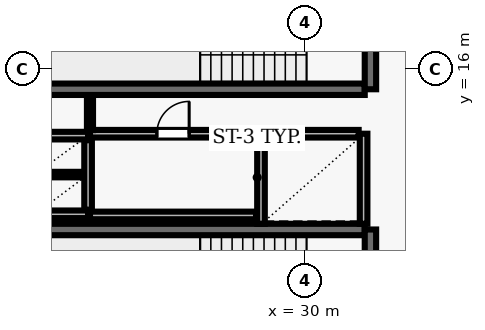
"""IFC4 building model, lengths in metres.
Left out: names, types, materials, properties, quantities, classifications, styles, units other than length and angle.
Written with IfcOpenShell. Run it as: python <this file> out.ifc"""

import sys

from ifc_helpers import new_model, si_unit, direction, frame, frame_2d, origin, place, context, subcontext, project, spatial, rectangle, extrude, element, fill, save


model = new_model("IFC4")
c1 = context("Model", 3, precision=1e-05, world=origin(), true_north=direction((0.0, 1.0)))
c2 = subcontext(c1, "Body", "Model", "MODEL_VIEW")
j1 = project(units=[si_unit("LENGTHUNIT", "METRE"), si_unit("PLANEANGLEUNIT", "RADIAN")], contexts=[c1])
p1 = place(None, origin())
s1 = spatial("IfcSite", under=j1, at=p1, CompositionType="ELEMENT")
p2 = place(p1, origin())
s2 = spatial("IfcBuilding", under=s1, at=p2, CompositionType="ELEMENT")
p3 = place(p2, frame((0.0, 0.0, 154.1)))
s3 = spatial("IfcBuildingStorey", under=s2, at=p3, CompositionType="ELEMENT", Elevation=154.1)
p4 = place(p3, frame((23.22, 15.47, 0.0), z_axis=(0.0, 0.0, 1.0), x_axis=(1.0, 0.0, 0.0)))
e1 = element("IfcWall", 1, at=p4, inside=s3, PredefinedType="SHEAR", context=c2, shape_type="SweptSolid", body=[
    extrude(rectangle(XDim=8.36, YDim=0.3, at=frame_2d((4.18, 0.0))), origin(), (0.0, 0.0, 1.0), 3.69),
])
p5 = place(p3, frame((31.73, 15.47, 0.0), z_axis=(0.0, 0.0, 1.0), x_axis=(0.0, 1.0, 0.0)))
e2 = element("IfcWall", 2, at=p5, inside=s3, PredefinedType="SHEAR", context=c2, shape_type="SweptSolid", body=[
    extrude(rectangle(XDim=3.51, YDim=0.3, at=frame_2d((1.755, 0.0))), origin(), (0.0, 0.0, 1.0), 3.69),
])
p6 = place(p5, frame((1.18, 0.0, 0.0)))
e3 = element("IfcOpeningElement", 3, at=p6, cuts=e2, PredefinedType="OPENING", context=c2, shape_type="SweptSolid", body=[
    extrude(rectangle(XDim=1.15, YDim=2.15, at=frame_2d((0.575, 1.075))), frame((0.0, 0.16, 0.0), z_axis=(0.0, -1.0, 0.0), x_axis=(1.0, 0.0, 0.0)), (0.0, 0.0, 1.0), 0.32),
])
p7 = place(p3, frame((31.58, 11.78, 0.0), z_axis=(0.0, 0.0, 1.0), x_axis=(-1.0, 0.0, 0.0)))
e4 = element("IfcWall", 4, at=p7, inside=s3, PredefinedType="SHEAR", context=c2, shape_type="SweptSolid", body=[
    extrude(rectangle(XDim=8.36, YDim=0.3, at=frame_2d((4.18, 0.0))), origin(), (0.0, 0.0, 1.0), 3.69),
])
p8 = place(p3, frame((31.73, 8.27, 0.0), z_axis=(0.0, 0.0, 1.0), x_axis=(0.0, 1.0, 0.0)))
e5 = element("IfcWall", 5, at=p8, inside=s3, PredefinedType="SHEAR", context=c2, shape_type="SweptSolid", body=[
    extrude(rectangle(XDim=3.51, YDim=0.3, at=frame_2d((1.755, 0.0))), origin(), (0.0, 0.0, 1.0), 3.69),
])
p9 = place(p8, frame((1.18, 0.0, 0.0)))
e6 = element("IfcOpeningElement", 6, at=p9, cuts=e5, PredefinedType="OPENING", context=c2, shape_type="SweptSolid", body=[
    extrude(rectangle(XDim=1.15, YDim=2.15, at=frame_2d((0.575, 1.075))), frame((0.0, 0.16, 0.0), z_axis=(0.0, -1.0, 0.0), x_axis=(1.0, 0.0, 0.0)), (0.0, 0.0, 1.0), 0.32),
])
for number, where, z_axis, x_axis in (
    (7, (28.85, 14.3, 0.0), (0.0, 0.0, 1.0), (0.0, -1.0, 0.0)),
    (8, (31.55, 11.93, 0.0), (0.0, 0.0, 1.0), (0.0, 1.0, 0.0)),
):
    element("IfcWall", number, at=place(p3, frame(where, z_axis=z_axis, x_axis=x_axis)), inside=s3, PredefinedType="SOLIDWALL", context=c2, shape_type="SweptSolid", body=[
        extrude(rectangle(XDim=2.37, YDim=0.2, at=frame_2d((1.185, 0.0))), origin(), (0.0, 0.0, 1.0), 3.69),
    ])
p10 = place(p3, frame((31.42, 14.3, 0.0), z_axis=(0.0, 0.0, 1.0), x_axis=(-1.0, 0.0, 0.0)))
e9 = element("IfcWall", 9, at=p10, inside=s3, PredefinedType="SOLIDWALL", context=c2, shape_type="SweptSolid", body=[
    extrude(rectangle(XDim=2.44, YDim=0.2, at=frame_2d((1.22, 0.0))), origin(), (0.0, 0.0, 1.0), 3.69),
])
for number, where, z_axis, x_axis in (
    (10, (22.9, 14.25, 0.0), (0.0, 0.0, 1.0), (1.0, 0.0, 0.0)),
    (11, (22.9, 12.18, 0.0), (0.0, 0.0, 1.0), (1.0, 0.0, 0.0)),
):
    element("IfcWall", number, at=place(p3, frame(where, z_axis=z_axis, x_axis=x_axis)), inside=s3, PredefinedType="SOLIDWALL", context=c2, shape_type="SweptSolid", body=[
        extrude(rectangle(XDim=1.4, YDim=0.2, at=frame_2d((0.7, 0.0))), origin(), (0.0, 0.0, 1.0), 3.69),
    ])
p11 = place(p3, frame((24.3, 12.3, 0.0), z_axis=(0.0, 0.0, 1.0), x_axis=(0.0, 1.0, 0.0)))
e12 = element("IfcWall", 12, at=p11, inside=s3, PredefinedType="SOLIDWALL", context=c2, shape_type="SweptSolid", body=[
    extrude(rectangle(XDim=1.83, YDim=0.2, at=frame_2d((0.915, 0.0))), origin(), (0.0, 0.0, 1.0), 3.69),
])
p12 = place(p3, frame((23.01, 13.225, 0.0), z_axis=(0.0, 0.0, 1.0), x_axis=(1.0, 0.0, 0.0)))
e13 = element("IfcWall", 13, at=p12, inside=s3, PredefinedType="PARTITIONING", context=c2, shape_type="SweptSolid", body=[
    extrude(rectangle(XDim=1.18, YDim=0.145, at=frame_2d((0.59, 0.0))), origin(), (0.0, 0.0, 1.0), 3.69),
])
p13 = place(p3, frame((24.35, 12.15, 0.0), z_axis=(0.0, 0.0, 1.0), x_axis=(1.0, 0.0, 0.0)))
e14 = element("IfcWall", 14, at=p13, inside=s3, PredefinedType="SOLIDWALL", context=c2, shape_type="SweptSolid", body=[
    extrude(rectangle(XDim=4.37, YDim=0.2, at=frame_2d((2.185, 0.0))), origin(), (0.0, 0.0, 1.0), 3.69),
])
p14 = place(p3, frame((24.35, 14.3, 0.0), z_axis=(0.0, 0.0, 1.0), x_axis=(1.0, 0.0, 0.0)))
e15 = element("IfcWall", 15, at=p14, inside=s3, PredefinedType="SOLIDWALL", context=c2, shape_type="SweptSolid", body=[
    extrude(rectangle(XDim=4.37, YDim=0.2, at=frame_2d((2.185, 0.0))), origin(), (0.0, 0.0, 1.0), 3.69),
])
p15 = place(p14, frame((1.76, 0.0, 0.0)))
e16 = element("IfcOpeningElement", 16, at=p15, cuts=e15, PredefinedType="OPENING", context=c2, shape_type="SweptSolid", body=[
    extrude(rectangle(XDim=0.85, YDim=2.1, at=frame_2d((0.425, 1.05))), frame((0.0, 0.11, 0.0), z_axis=(0.0, -1.0, 0.0), x_axis=(1.0, 0.0, 0.0)), (0.0, 0.0, 1.0), 0.22),
])
p16 = place(p3, frame((24.35, 15.29, 0.0), z_axis=(0.0, 0.0, 1.0), x_axis=(0.0, -1.0, 0.0)))
e17 = element("IfcWall", 17, at=p16, inside=s3, PredefinedType="PARTITIONING", context=c2, shape_type="SweptSolid", body=[
    extrude(rectangle(XDim=0.895, YDim=0.16, at=frame_2d((0.448, 0.0))), origin(), (0.0, 0.0, 1.0), 3.69),
])
p17 = place(p15, origin())
e18 = element("IfcDoor", 18, at=p17, inside=s3, OperationType="SINGLE_SWING_RIGHT", PredefinedType="DOOR", context=c2, shape_type="SweptSolid", body=[
    extrude(rectangle(XDim=0.85, YDim=2.1, at=frame_2d((0.425, 1.05))), frame((0.0, 0.025, 0.0), z_axis=(0.0, -1.0, 0.0), x_axis=(1.0, 0.0, 0.0)), (0.0, 0.0, 1.0), 0.05),
])
fill(e16, e18)
save(model, sys.argv[1])
